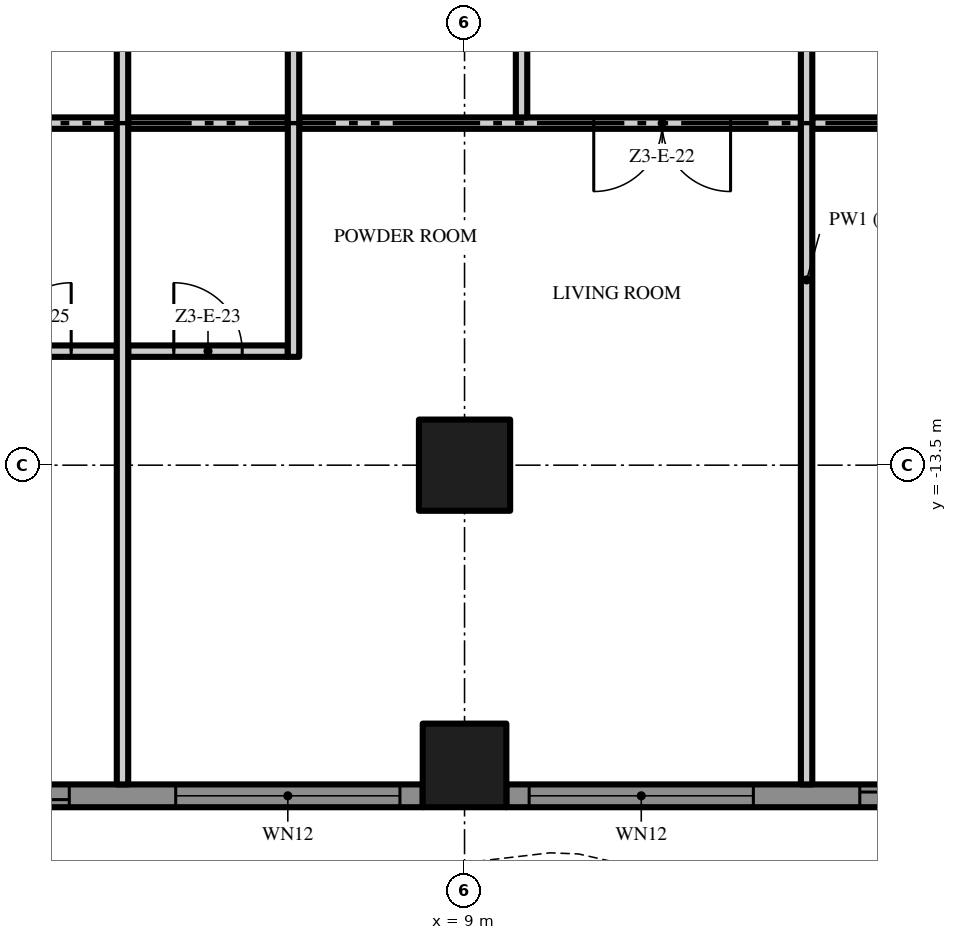
"""IFC4 building model, lengths in metres.
Left out: names, types, materials, properties, quantities, classifications, styles, units other than length and angle.
Written with IfcOpenShell. Run it as: python <this file> out.ifc"""

import sys

from ifc_helpers import new_model, si_unit, direction, frame, frame_2d, origin, origin_2d, place, context, subcontext, project, spatial, polyline, rectangle, outline, extrude, element, fill, save


model = new_model("IFC4")
c1 = context("Model", 3, precision=1e-05, world=origin(), true_north=direction((0.0, 1.0)))
c2 = subcontext(c1, "Body", "Model", "MODEL_VIEW")
j1 = project(units=[si_unit("LENGTHUNIT", "METRE"), si_unit("PLANEANGLEUNIT", "RADIAN")], contexts=[c1])
p1 = place(None, origin())
s1 = spatial("IfcSite", under=j1, at=p1, CompositionType="ELEMENT")
p2 = place(p1, origin())
s2 = spatial("IfcBuilding", under=s1, at=p2, CompositionType="ELEMENT")
p3 = place(p2, frame((0.0, 0.0, 170.6)))
s3 = spatial("IfcBuildingStorey", under=s2, at=p3, CompositionType="ELEMENT", Elevation=170.6)
p4 = place(p3, frame((9.0, -13.5, 0.0), z_axis=(0.0, 0.0, 1.0), x_axis=(1.0, 0.0, 0.0)))
e1 = element("IfcColumn", 1, at=p4, inside=s3, PredefinedType="COLUMN", context=c2, shape_type="SweptSolid", body=[
    extrude(rectangle(XDim=1.2, YDim=1.2, at=origin_2d()), origin(), (0.0, 0.0, 1.0), 3.5),
])
p5 = place(p3, frame((9.0, -17.45, 0.0), z_axis=(0.0, 0.0, 1.0), x_axis=(1.0, 0.0, 0.0)))
e2 = element("IfcColumn", 2, at=p5, inside=s3, PredefinedType="COLUMN", context=c2, shape_type="SweptSolid", body=[
    extrude(rectangle(XDim=1.1, YDim=1.1, at=origin_2d()), origin(), (0.0, 0.0, 1.0), 3.5),
])
p6 = place(p3, frame((8.45, -17.85, 0.0), z_axis=(0.0, 0.0, 1.0), x_axis=(-1.0, 0.0, 0.0)))
e3 = element("IfcWall", 3, at=p6, inside=s3, PredefinedType="SOLIDWALL", context=c2, shape_type="SweptSolid", body=[
    extrude(rectangle(XDim=7.9, YDim=0.3, at=frame_2d((3.95, 0.0))), origin(), (0.0, 0.0, 1.0), 3.5),
])
p7 = place(p6, frame((4.65, 0.0, 0.0)))
e4 = element("IfcOpeningElement", 4, at=p7, cuts=e3, PredefinedType="OPENING", context=c2, shape_type="SweptSolid", body=[
    extrude(rectangle(XDim=2.95, YDim=2.4, at=frame_2d((1.475, 1.2))), frame((0.0, 0.16, 0.0), z_axis=(0.0, -1.0, 0.0), x_axis=(1.0, 0.0, 0.0)), (0.0, 0.0, 1.0), 0.32),
])
p8 = place(p6, frame((0.3, 0.0, 0.45)))
e5 = element("IfcOpeningElement", 5, at=p8, cuts=e3, PredefinedType="OPENING", context=c2, shape_type="SweptSolid", body=[
    extrude(rectangle(XDim=2.95, YDim=2.65, at=frame_2d((1.475, 1.325))), frame((0.0, 0.16, 0.0), z_axis=(0.0, -1.0, 0.0), x_axis=(1.0, 0.0, 0.0)), (0.0, 0.0, 1.0), 0.32),
])
p9 = place(p3, frame((16.9, -17.85, 0.0), z_axis=(0.0, 0.0, 1.0), x_axis=(-1.0, 0.0, 0.0)))
e6 = element("IfcWall", 6, at=p9, inside=s3, PredefinedType="SOLIDWALL", context=c2, shape_type="SweptSolid", body=[
    extrude(rectangle(XDim=7.35, YDim=0.3, at=frame_2d((3.675, 0.0))), origin(), (0.0, 0.0, 1.0), 3.5),
])
p10 = place(p9, frame((4.1, 0.0, 0.45)))
e7 = element("IfcOpeningElement", 7, at=p10, cuts=e6, PredefinedType="OPENING", context=c2, shape_type="SweptSolid", body=[
    extrude(rectangle(XDim=2.95, YDim=2.65, at=frame_2d((1.475, 1.325))), frame((0.0, 0.16, 0.0), z_axis=(0.0, -1.0, 0.0), x_axis=(1.0, 0.0, 0.0)), (0.0, 0.0, 1.0), 0.32),
])
p11 = place(p9, frame((0.3, 0.0, 0.0)))
e8 = element("IfcOpeningElement", 8, at=p11, cuts=e6, PredefinedType="OPENING", context=c2, shape_type="SweptSolid", body=[
    extrude(rectangle(XDim=2.4, YDim=2.4, at=frame_2d((1.2, 1.2))), frame((0.0, 0.16, 0.0), z_axis=(0.0, -1.0, 0.0), x_axis=(1.0, 0.0, 0.0)), (0.0, 0.0, 1.0), 0.32),
])
p12 = place(p3, origin())
e9 = element("IfcWall", 9, at=p12, inside=s3, PredefinedType="USERDEFINED", context=c2, shape_type="SweptSolid", body=[
    extrude(outline(polyline([(-18.0, -18.951), (-16.5, -19.612), (-15.0, -20.345), (-13.5, -20.869), (-12.375, -21.0), (-12.0, -20.985), (-10.5, -20.649), (-9.0, -19.988), (-7.5, -19.255), (-6.0, -18.731), (-4.875, -18.6), (-4.5, -18.615), (-3.0, -18.951), (-1.5, -19.612), (0.0, -20.345), (1.5, -20.869), (2.625, -21.0), (3.0, -20.985), (4.5, -20.649), (6.0, -19.988), (7.5, -19.255), (9.0, -18.731), (10.125, -18.6), (10.5, -18.615), (12.0, -18.951), (13.5, -19.612), (15.0, -20.345), (16.5, -20.869), (17.625, -21.0), (18.0, -20.985), (17.99, -20.735), (17.635, -20.749), (16.556, -20.624), (15.096, -20.114), (13.605, -19.385), (12.079, -18.713), (10.533, -18.366), (10.115, -18.349), (8.944, -18.486), (7.404, -19.024), (5.895, -19.761), (4.421, -20.41), (2.967, -20.736), (2.635, -20.749), (1.556, -20.624), (0.096, -20.114), (-1.395, -19.385), (-2.921, -18.713), (-4.467, -18.366), (-4.885, -18.349), (-6.056, -18.486), (-7.596, -19.024), (-9.105, -19.761), (-10.579, -20.41), (-12.033, -20.736), (-12.365, -20.749), (-13.444, -20.624), (-14.904, -20.114), (-16.395, -19.385), (-17.899, -18.723), (-18.0, -18.951)])), origin(), (0.0, 0.0, 1.0), 0.9),
])
p13 = place(p3, frame((2.325, -12.0, 0.0), z_axis=(0.0, 0.0, 1.0), x_axis=(1.0, 0.0, 0.0)))
e10 = element("IfcWall", 10, at=p13, inside=s3, PredefinedType="PARTITIONING", context=c2, shape_type="SweptSolid", body=[
    extrude(rectangle(XDim=2.1, YDim=0.15, at=frame_2d((1.05, 0.0))), origin(), (0.0, 0.0, 1.0), 3.5),
])
p14 = place(p13, frame((0.6, 0.0, 0.0)))
e11 = element("IfcOpeningElement", 11, at=p14, cuts=e10, PredefinedType="OPENING", context=c2, shape_type="SweptSolid", body=[
    extrude(rectangle(XDim=0.9, YDim=2.1, at=frame_2d((0.45, 1.05))), frame((0.0, 0.085, 0.0), z_axis=(0.0, -1.0, 0.0), x_axis=(1.0, 0.0, 0.0)), (0.0, 0.0, 1.0), 0.17),
])
p15 = place(p3, frame((4.575, -12.0, 0.0), z_axis=(0.0, 0.0, 1.0), x_axis=(1.0, 0.0, 0.0)))
e12 = element("IfcWall", 12, at=p15, inside=s3, PredefinedType="PARTITIONING", context=c2, shape_type="SweptSolid", body=[
    extrude(rectangle(XDim=2.1, YDim=0.15, at=frame_2d((1.05, 0.0))), origin(), (0.0, 0.0, 1.0), 3.5),
])
p16 = place(p15, frame((0.6, 0.0, 0.0)))
e13 = element("IfcOpeningElement", 13, at=p16, cuts=e12, PredefinedType="OPENING", context=c2, shape_type="SweptSolid", body=[
    extrude(rectangle(XDim=0.9, YDim=2.1, at=frame_2d((0.45, 1.05))), frame((0.0, 0.085, 0.0), z_axis=(0.0, -1.0, 0.0), x_axis=(1.0, 0.0, 0.0)), (0.0, 0.0, 1.0), 0.17),
])
for number, where, z_axis, x_axis in (
    (14, (2.325, -9.0, 0.0), (0.0, 0.0, 1.0), (1.0, 0.0, 0.0)),
    (15, (4.575, -9.0, 0.0), (0.0, 0.0, 1.0), (1.0, 0.0, 0.0)),
):
    element("IfcWall", number, at=place(p3, frame(where, z_axis=z_axis, x_axis=x_axis)), inside=s3, PredefinedType="PARTITIONING", context=c2, shape_type="SweptSolid", body=[
        extrude(rectangle(XDim=2.1, YDim=0.15, at=frame_2d((1.05, 0.0))), origin(), (0.0, 0.0, 1.0), 3.5),
    ])
p17 = place(p3, frame((13.425, -9.0, 0.0), z_axis=(0.0, 0.0, 1.0), x_axis=(-1.0, 0.0, 0.0)))
e16 = element("IfcWall", 16, at=p17, inside=s3, PredefinedType="PARTITIONING", context=c2, shape_type="SweptSolid", body=[
    extrude(rectangle(XDim=6.6, YDim=0.15, at=frame_2d((3.3, 0.0))), origin(), (0.0, 0.0, 1.0), 3.5),
])
p18 = place(p17, frame((0.925, 0.0, 0.0)))
e17 = element("IfcOpeningElement", 17, at=p18, cuts=e16, PredefinedType="OPENING", context=c2, shape_type="SweptSolid", body=[
    extrude(rectangle(XDim=1.8, YDim=2.4, at=frame_2d((0.9, 1.2))), frame((0.0, 0.085, 0.0), z_axis=(0.0, -1.0, 0.0), x_axis=(1.0, 0.0, 0.0)), (0.0, 0.0, 1.0), 0.17),
])
p19 = place(p3, frame((22.2, -9.0, 0.0), z_axis=(0.0, 0.0, 1.0), x_axis=(-1.0, 0.0, 0.0)))
e18 = element("IfcWall", 18, at=p19, inside=s3, PredefinedType="PARTITIONING", context=c2, shape_type="SweptSolid", body=[
    extrude(rectangle(XDim=8.625, YDim=0.15, at=frame_2d((4.312, 0.0))), origin(), (0.0, 0.0, 1.0), 3.5),
])
p20 = place(p19, frame((0.8, 0.0, 0.0)))
e19 = element("IfcOpeningElement", 19, at=p20, cuts=e18, PredefinedType="OPENING", context=c2, shape_type="SweptSolid", body=[
    extrude(rectangle(XDim=1.5, YDim=2.4, at=frame_2d((0.75, 1.2))), frame((0.0, 0.085, 0.0), z_axis=(0.0, -1.0, 0.0), x_axis=(1.0, 0.0, 0.0)), (0.0, 0.0, 1.0), 0.17),
])
p21 = place(p3, frame((4.5, -17.7, 0.0), z_axis=(0.0, 0.0, 1.0), x_axis=(0.0, 1.0, 0.0)))
e20 = element("IfcWall", 20, at=p21, inside=s3, PredefinedType="PARTITIONING", context=c2, shape_type="SweptSolid", body=[
    extrude(rectangle(XDim=13.125, YDim=0.15, at=frame_2d((6.562, 0.0))), origin(), (0.0, 0.0, 1.0), 3.5),
])
p22 = place(p3, frame((6.75, -12.075, 0.0), z_axis=(0.0, 0.0, 1.0), x_axis=(0.0, 1.0, 0.0)))
e21 = element("IfcWall", 21, at=p22, inside=s3, PredefinedType="PARTITIONING", context=c2, shape_type="SweptSolid", body=[
    extrude(rectangle(XDim=7.5, YDim=0.15, at=frame_2d((3.75, 0.0))), origin(), (0.0, 0.0, 1.0), 3.5),
])
p23 = place(p3, frame((9.75, -8.925, 0.0), z_axis=(0.0, 0.0, 1.0), x_axis=(0.0, 1.0, 0.0)))
e22 = element("IfcWall", 22, at=p23, inside=s3, PredefinedType="PARTITIONING", context=c2, shape_type="SweptSolid", body=[
    extrude(rectangle(XDim=4.5, YDim=0.15, at=frame_2d((2.25, 0.0))), origin(), (0.0, 0.0, 1.0), 3.5),
])
p24 = place(p3, frame((13.5, -17.7, 0.0), z_axis=(0.0, 0.0, 1.0), x_axis=(0.0, 1.0, 0.0)))
e23 = element("IfcWall", 23, at=p24, inside=s3, PredefinedType="PARTITIONING", context=c2, shape_type="SweptSolid", body=[
    extrude(rectangle(XDim=13.275, YDim=0.15, at=frame_2d((6.638, 0.0))), origin(), (0.0, 0.0, 1.0), 3.5),
])
p25 = place(p7, origin())
e24 = element("IfcDoor", 24, at=p25, inside=s3, OperationType="SINGLE_SWING_LEFT", PredefinedType="DOOR", context=c2, shape_type="SweptSolid", body=[
    extrude(rectangle(XDim=2.95, YDim=2.4, at=frame_2d((1.475, 1.2))), frame((0.0, 0.025, 0.0), z_axis=(0.0, -1.0, 0.0), x_axis=(1.0, 0.0, 0.0)), (0.0, 0.0, 1.0), 0.05),
])
fill(e4, e24)
p26 = place(p8, origin())
e25 = element("IfcWindow", 25, at=p26, inside=s3, PartitioningType="SINGLE_PANEL", PredefinedType="WINDOW", context=c2, shape_type="SweptSolid", body=[
    extrude(rectangle(XDim=2.95, YDim=2.65, at=frame_2d((1.475, 1.325))), frame((0.0, 0.03, 0.0), z_axis=(0.0, -1.0, 0.0), x_axis=(1.0, 0.0, 0.0)), (0.0, 0.0, 1.0), 0.06),
])
fill(e5, e25)
p27 = place(p10, origin())
e26 = element("IfcWindow", 26, at=p27, inside=s3, PartitioningType="SINGLE_PANEL", PredefinedType="WINDOW", context=c2, shape_type="SweptSolid", body=[
    extrude(rectangle(XDim=2.95, YDim=2.65, at=frame_2d((1.475, 1.325))), frame((0.0, 0.03, 0.0), z_axis=(0.0, -1.0, 0.0), x_axis=(1.0, 0.0, 0.0)), (0.0, 0.0, 1.0), 0.06),
])
fill(e7, e26)
p28 = place(p11, origin())
e27 = element("IfcDoor", 27, at=p28, inside=s3, OperationType="SINGLE_SWING_LEFT", PredefinedType="DOOR", context=c2, shape_type="SweptSolid", body=[
    extrude(rectangle(XDim=2.4, YDim=2.4, at=frame_2d((1.2, 1.2))), frame((0.0, 0.025, 0.0), z_axis=(0.0, -1.0, 0.0), x_axis=(1.0, 0.0, 0.0)), (0.0, 0.0, 1.0), 0.05),
])
fill(e8, e27)
p29 = place(p18, origin())
e28 = element("IfcDoor", 28, at=p29, inside=s3, OperationType="DOUBLE_DOOR_SINGLE_SWING", PredefinedType="DOOR", context=c2, shape_type="SweptSolid", body=[
    extrude(rectangle(XDim=1.8, YDim=2.4, at=frame_2d((0.9, 1.2))), frame((0.0, 0.025, 0.0), z_axis=(0.0, -1.0, 0.0), x_axis=(1.0, 0.0, 0.0)), (0.0, 0.0, 1.0), 0.05),
])
fill(e17, e28)
p30 = place(p16, origin())
e29 = element("IfcDoor", 29, at=p30, inside=s3, OperationType="SINGLE_SWING_LEFT", PredefinedType="DOOR", context=c2, shape_type="SweptSolid", body=[
    extrude(rectangle(XDim=0.9, YDim=2.1, at=frame_2d((0.45, 1.05))), frame((0.0, 0.025, 0.0), z_axis=(0.0, -1.0, 0.0), x_axis=(1.0, 0.0, 0.0)), (0.0, 0.0, 1.0), 0.05),
])
fill(e13, e29)
p31 = place(p14, origin())
e30 = element("IfcDoor", 30, at=p31, inside=s3, OperationType="SINGLE_SWING_RIGHT", PredefinedType="DOOR", context=c2, shape_type="SweptSolid", body=[
    extrude(rectangle(XDim=0.9, YDim=2.1, at=frame_2d((0.45, 1.05))), frame((0.0, 0.025, 0.0), z_axis=(0.0, -1.0, 0.0), x_axis=(1.0, 0.0, 0.0)), (0.0, 0.0, 1.0), 0.05),
])
fill(e11, e30)
save(model, sys.argv[1])
